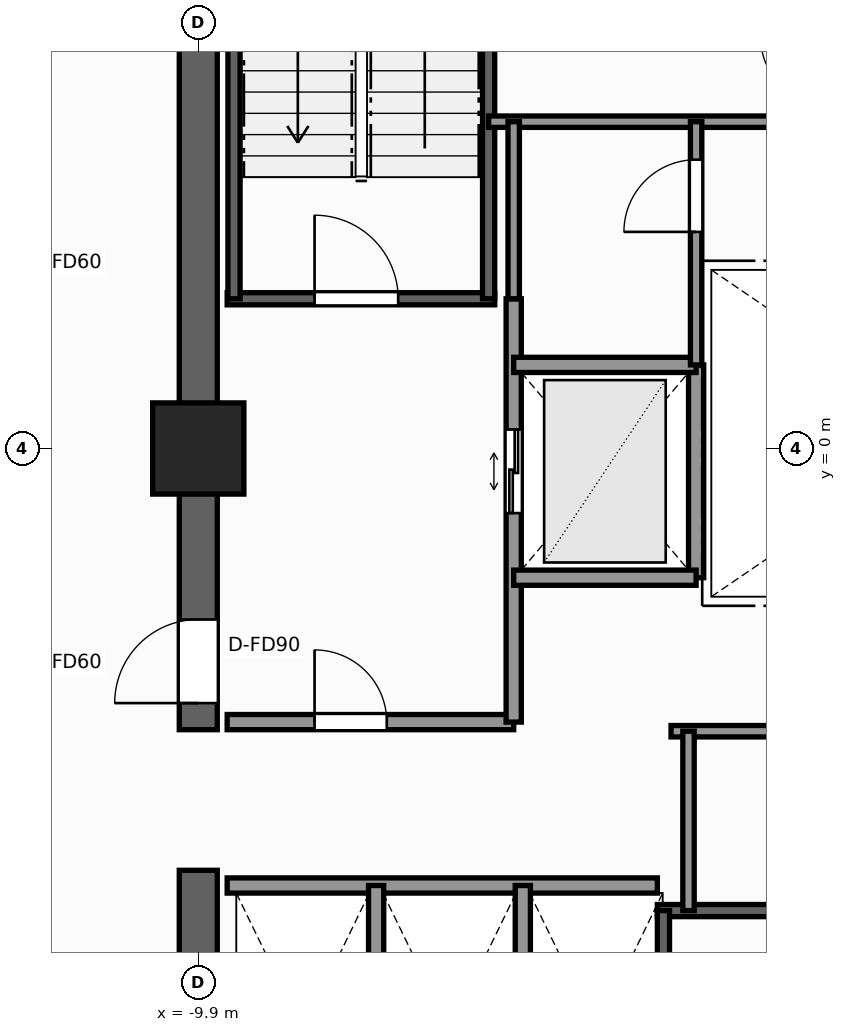
"""IFC4 building model, lengths in metres.
Left out: names, types, materials, properties, quantities, classifications, styles, units other than length and angle.
Written with IfcOpenShell. Run it as: python <this file> out.ifc"""

import sys

from ifc_helpers import new_model, si_unit, direction, frame, frame_2d, origin, origin_2d, place, context, subcontext, project, spatial, rectangle, extrude, element, fill, save


model = new_model("IFC4")
c1 = context("Model", 3, precision=1e-05, world=origin(), true_north=direction((0.0, 1.0)))
c2 = subcontext(c1, "Body", "Model", "MODEL_VIEW")
j1 = project(units=[si_unit("LENGTHUNIT", "METRE"), si_unit("PLANEANGLEUNIT", "RADIAN")], contexts=[c1])
p1 = place(None, origin())
s1 = spatial("IfcSite", under=j1, at=p1, CompositionType="ELEMENT")
p2 = place(p1, origin())
s2 = spatial("IfcBuilding", under=s1, at=p2, CompositionType="ELEMENT")
p3 = place(p2, frame((0.0, 0.0, 156.9)))
s3 = spatial("IfcBuildingStorey", under=s2, at=p3, CompositionType="ELEMENT", Elevation=156.9)
p4 = place(p3, frame((-9.9, -9.65, 0.0), z_axis=(0.0, 0.0, 1.0), x_axis=(0.0, 1.0, 0.0)))
e1 = element("IfcWall", 1, at=p4, inside=s3, PredefinedType="SHEAR", context=c2, shape_type="SweptSolid", body=[
    extrude(rectangle(XDim=4.1, YDim=0.5, at=frame_2d((2.05, 0.0))), origin(), (0.0, 0.0, 1.0), 3.3),
])
p5 = place(p3, frame((-9.9, -3.7, 0.0), z_axis=(0.0, 0.0, 1.0), x_axis=(0.0, 1.0, 0.0)))
e2 = element("IfcWall", 2, at=p5, inside=s3, PredefinedType="SHEAR", context=c2, shape_type="SweptSolid", body=[
    extrude(rectangle(XDim=13.35, YDim=0.5, at=frame_2d((6.675, 0.0))), origin(), (0.0, 0.0, 1.0), 3.3),
])
p6 = place(p5, frame((0.35, 0.0, 0.0)))
e3 = element("IfcOpeningElement", 3, at=p6, cuts=e2, PredefinedType="OPENING", context=c2, shape_type="SweptSolid", body=[
    extrude(rectangle(XDim=1.1, YDim=2.2, at=frame_2d((0.55, 1.1))), frame((0.0, 0.26, 0.0), z_axis=(0.0, -1.0, 0.0), x_axis=(1.0, 0.0, 0.0)), (0.0, 0.0, 1.0), 0.52),
])
p7 = place(p3, frame((-9.9, 0.0, 0.0), z_axis=(0.0, 0.0, 1.0), x_axis=(1.0, 0.0, 0.0)))
e4 = element("IfcColumn", 4, at=p7, inside=s3, PredefinedType="COLUMN", context=c2, shape_type="SweptSolid", body=[
    extrude(rectangle(XDim=1.2, YDim=1.2, at=origin_2d()), origin(), (0.0, 0.0, 1.0), 3.3),
])
p8 = place(p3, frame((-9.52, 1.97, 0.0), z_axis=(0.0, 0.0, 1.0), x_axis=(1.0, 0.0, 0.0)))
e5 = element("IfcWall", 5, at=p8, inside=s3, PredefinedType="SHEAR", context=c2, shape_type="SweptSolid", body=[
    extrude(rectangle(XDim=3.52, YDim=0.16, at=frame_2d((1.76, 0.0))), origin(), (0.0, 0.0, 1.0), 3.3),
])
p9 = place(p8, frame((1.15, 0.0, 0.0)))
e6 = element("IfcOpeningElement", 6, at=p9, cuts=e5, PredefinedType="OPENING", context=c2, shape_type="SweptSolid", body=[
    extrude(rectangle(XDim=1.1, YDim=2.2, at=frame_2d((0.55, 1.1))), frame((0.0, 0.09, 0.0), z_axis=(0.0, -1.0, 0.0), x_axis=(1.0, 0.0, 0.0)), (0.0, 0.0, 1.0), 0.18),
])
for number, where, z_axis, x_axis in (
    (7, (-9.43, 1.97, 0.0), (0.0, 0.0, 1.0), (0.0, 1.0, 0.0)),
    (8, (-6.08, 1.97, 0.0), (0.0, 0.0, 1.0), (0.0, 1.0, 0.0)),
):
    element("IfcWall", number, at=place(p3, frame(where, z_axis=z_axis, x_axis=x_axis)), inside=s3, PredefinedType="SHEAR", context=c2, shape_type="SweptSolid", body=[
        extrude(rectangle(XDim=7.56, YDim=0.16, at=frame_2d((3.78, 0.0))), origin(), (0.0, 0.0, 1.0), 3.3),
    ])
p10 = place(p3, frame((-3.86, -6.08, 0.0), z_axis=(0.0, 0.0, 1.0), x_axis=(1.0, 0.0, 0.0)))
e9 = element("IfcWall", 9, at=p10, inside=s3, PredefinedType="SHEAR", context=c2, shape_type="SweptSolid", body=[
    extrude(rectangle(XDim=7.72, YDim=0.16, at=frame_2d((3.86, 0.0))), origin(), (0.0, 0.0, 1.0), 3.3),
])
p11 = place(p3, frame((-3.78, -9.43, 0.0), z_axis=(0.0, 0.0, 1.0), x_axis=(0.0, 1.0, 0.0)))
e10 = element("IfcWall", 10, at=p11, inside=s3, PredefinedType="SHEAR", context=c2, shape_type="SweptSolid", body=[
    extrude(rectangle(XDim=3.35, YDim=0.16, at=frame_2d((1.675, 0.0))), origin(), (0.0, 0.0, 1.0), 3.3),
])
p12 = place(p3, frame((-9.52, -3.6, 0.0), z_axis=(0.0, 0.0, 1.0), x_axis=(1.0, 0.0, 0.0)))
e11 = element("IfcWall", 11, at=p12, inside=s3, PredefinedType="SOLIDWALL", context=c2, shape_type="SweptSolid", body=[
    extrude(rectangle(XDim=3.77, YDim=0.2, at=frame_2d((1.885, 0.0))), origin(), (0.0, 0.0, 1.0), 3.1),
])
p13 = place(p12, frame((1.15, 0.0, 0.0)))
e12 = element("IfcOpeningElement", 12, at=p13, cuts=e11, PredefinedType="OPENING", context=c2, shape_type="SweptSolid", body=[
    extrude(rectangle(XDim=0.95, YDim=2.06, at=frame_2d((0.475, 1.03))), frame((0.0, 0.11, 0.0), z_axis=(0.0, -1.0, 0.0), x_axis=(1.0, 0.0, 0.0)), (0.0, 0.0, 1.0), 0.22),
])
p14 = place(p3, frame((-5.75, -3.6, 0.0), z_axis=(0.0, 0.0, 1.0), x_axis=(0.0, 1.0, 0.0)))
e13 = element("IfcWall", 13, at=p14, inside=s3, PredefinedType="SOLIDWALL", context=c2, shape_type="SweptSolid", body=[
    extrude(rectangle(XDim=5.57, YDim=0.2, at=frame_2d((2.785, 0.0))), origin(), (0.0, 0.0, 1.0), 2.735),
])
p15 = place(p14, frame((2.75, 0.0, 0.0)))
e14 = element("IfcOpeningElement", 14, at=p15, cuts=e13, PredefinedType="OPENING", context=c2, shape_type="SweptSolid", body=[
    extrude(rectangle(XDim=1.1, YDim=2.2, at=frame_2d((0.55, 1.1))), frame((0.0, 0.11, 0.0), z_axis=(0.0, -1.0, 0.0), x_axis=(1.0, 0.0, 0.0)), (0.0, 0.0, 1.0), 0.22),
])
p16 = place(p3, frame((-3.35, -1.7, 0.0), z_axis=(0.0, 0.0, 1.0), x_axis=(0.0, 1.0, 0.0)))
e15 = element("IfcWall", 15, at=p16, inside=s3, PredefinedType="SOLIDWALL", context=c2, shape_type="SweptSolid", body=[
    extrude(rectangle(XDim=2.8, YDim=0.2, at=frame_2d((1.4, 0.0))), origin(), (0.0, 0.0, 1.0), 2.735),
])
for number, where, z_axis, x_axis in (
    (16, (-5.75, -1.7, 0.0), (0.0, 0.0, 1.0), (1.0, 0.0, 0.0)),
    (17, (-5.75, 1.1, 0.0), (0.0, 0.0, 1.0), (1.0, 0.0, 0.0)),
):
    element("IfcWall", number, at=place(p3, frame(where, z_axis=z_axis, x_axis=x_axis)), inside=s3, PredefinedType="SOLIDWALL", context=c2, shape_type="SweptSolid", body=[
        extrude(rectangle(XDim=2.4, YDim=0.2, at=frame_2d((1.2, 0.0))), origin(), (0.0, 0.0, 1.0), 3.1),
    ])
p17 = place(p3, frame((-6.08, 4.3, 0.0), z_axis=(0.0, 0.0, 1.0), x_axis=(1.0, 0.0, 0.0)))
e18 = element("IfcWall", 18, at=p17, inside=s3, PredefinedType="PARTITIONING", context=c2, shape_type="SweptSolid", body=[
    extrude(rectangle(XDim=6.3, YDim=0.15, at=frame_2d((3.15, 0.0))), origin(), (0.0, 0.0, 1.0), 3.1),
])
p18 = place(p3, frame((-9.52, -5.75, 0.0), z_axis=(0.0, 0.0, 1.0), x_axis=(1.0, 0.0, 0.0)))
e19 = element("IfcWall", 19, at=p18, inside=s3, PredefinedType="SOLIDWALL", context=c2, shape_type="SweptSolid", body=[
    extrude(rectangle(XDim=5.66, YDim=0.2, at=frame_2d((2.83, 0.0))), origin(), (0.0, 0.0, 1.0), 3.1),
])
for number, where, z_axis, x_axis in (
    (20, (-7.56, -9.52, 0.0), (0.0, 0.0, 1.0), (0.0, 1.0, 0.0)),
    (21, (-5.63, -9.52, 0.0), (0.0, 0.0, 1.0), (0.0, 1.0, 0.0)),
):
    element("IfcWall", number, at=place(p3, frame(where, z_axis=z_axis, x_axis=x_axis)), inside=s3, PredefinedType="SOLIDWALL", context=c2, shape_type="SweptSolid", body=[
        extrude(rectangle(XDim=3.77, YDim=0.2, at=frame_2d((1.885, 0.0))), origin(), (0.0, 0.0, 1.0), 3.1),
    ])
p19 = place(p3, frame((-3.68, -3.72, 0.0), z_axis=(0.0, 0.0, 1.0), x_axis=(1.0, 0.0, 0.0)))
e22 = element("IfcWall", 22, at=p19, inside=s3, PredefinedType="PARTITIONING", context=c2, shape_type="SweptSolid", body=[
    extrude(rectangle(XDim=7.36, YDim=0.15, at=frame_2d((3.68, 0.0))), origin(), (0.0, 0.0, 1.0), 3.1),
])
p20 = place(p3, frame((-3.45, -6.08, 0.0), z_axis=(0.0, 0.0, 1.0), x_axis=(0.0, 1.0, 0.0)))
e23 = element("IfcWall", 23, at=p20, inside=s3, PredefinedType="PARTITIONING", context=c2, shape_type="SweptSolid", body=[
    extrude(rectangle(XDim=2.36, YDim=0.15, at=frame_2d((1.18, 0.0))), origin(), (0.0, 0.0, 1.0), 3.1),
])
p21 = place(p3, frame((-3.35, 1.1, 0.0), z_axis=(0.0, 0.0, 1.0), x_axis=(0.0, 1.0, 0.0)))
e24 = element("IfcWall", 24, at=p21, inside=s3, PredefinedType="PARTITIONING", context=c2, shape_type="SweptSolid", body=[
    extrude(rectangle(XDim=3.2, YDim=0.15, at=frame_2d((1.6, 0.0))), origin(), (0.0, 0.0, 1.0), 2.735),
])
p22 = place(p21, frame((1.75, 0.0, 0.0)))
e25 = element("IfcOpeningElement", 25, at=p22, cuts=e24, PredefinedType="OPENING", context=c2, shape_type="SweptSolid", body=[
    extrude(rectangle(XDim=0.95, YDim=2.06, at=frame_2d((0.475, 1.03))), frame((0.0, 0.085, 0.0), z_axis=(0.0, -1.0, 0.0), x_axis=(1.0, 0.0, 0.0)), (0.0, 0.0, 1.0), 0.17),
])
p23 = place(p3, frame((-5.75, 1.97, 0.0), z_axis=(0.0, 0.0, 1.0), x_axis=(0.0, 1.0, 0.0)))
e26 = element("IfcWall", 26, at=p23, inside=s3, PredefinedType="PARTITIONING", context=c2, shape_type="SweptSolid", body=[
    extrude(rectangle(XDim=2.33, YDim=0.15, at=frame_2d((1.165, 0.0))), origin(), (0.0, 0.0, 1.0), 2.735),
])
p24 = place(p9, origin())
e27 = element("IfcDoor", 27, at=p24, inside=s3, OperationType="SINGLE_SWING_LEFT", PredefinedType="DOOR", context=c2, shape_type="SweptSolid", body=[
    extrude(rectangle(XDim=1.1, YDim=2.2, at=frame_2d((0.55, 1.1))), frame((0.0, 0.025, 0.0), z_axis=(0.0, -1.0, 0.0), x_axis=(1.0, 0.0, 0.0)), (0.0, 0.0, 1.0), 0.05),
])
fill(e6, e27)
p25 = place(p6, origin())
e28 = element("IfcDoor", 28, at=p25, inside=s3, OperationType="SINGLE_SWING_LEFT", PredefinedType="DOOR", context=c2, shape_type="SweptSolid", body=[
    extrude(rectangle(XDim=1.1, YDim=2.2, at=frame_2d((0.55, 1.1))), frame((0.0, 0.025, 0.0), z_axis=(0.0, -1.0, 0.0), x_axis=(1.0, 0.0, 0.0)), (0.0, 0.0, 1.0), 0.05),
])
fill(e3, e28)
p26 = place(p15, origin())
e29 = element("IfcDoor", 29, at=p26, inside=s3, OperationType="DOUBLE_DOOR_SLIDING", PredefinedType="DOOR", context=c2, shape_type="SweptSolid", body=[
    extrude(rectangle(XDim=1.1, YDim=2.2, at=frame_2d((0.55, 1.1))), frame((0.0, 0.025, 0.0), z_axis=(0.0, -1.0, 0.0), x_axis=(1.0, 0.0, 0.0)), (0.0, 0.0, 1.0), 0.05),
])
fill(e14, e29)
p27 = place(p13, origin())
e30 = element("IfcDoor", 30, at=p27, inside=s3, OperationType="SINGLE_SWING_LEFT", PredefinedType="DOOR", context=c2, shape_type="SweptSolid", body=[
    extrude(rectangle(XDim=0.95, YDim=2.06, at=frame_2d((0.475, 1.03))), frame((0.0, 0.025, 0.0), z_axis=(0.0, -1.0, 0.0), x_axis=(1.0, 0.0, 0.0)), (0.0, 0.0, 1.0), 0.05),
])
fill(e12, e30)
p28 = place(p22, origin())
e31 = element("IfcDoor", 31, at=p28, inside=s3, OperationType="SINGLE_SWING_LEFT", PredefinedType="DOOR", context=c2, shape_type="SweptSolid", body=[
    extrude(rectangle(XDim=0.95, YDim=2.06, at=frame_2d((0.475, 1.03))), frame((0.0, 0.025, 0.0), z_axis=(0.0, -1.0, 0.0), x_axis=(1.0, 0.0, 0.0)), (0.0, 0.0, 1.0), 0.05),
])
fill(e25, e31)
save(model, sys.argv[1])
